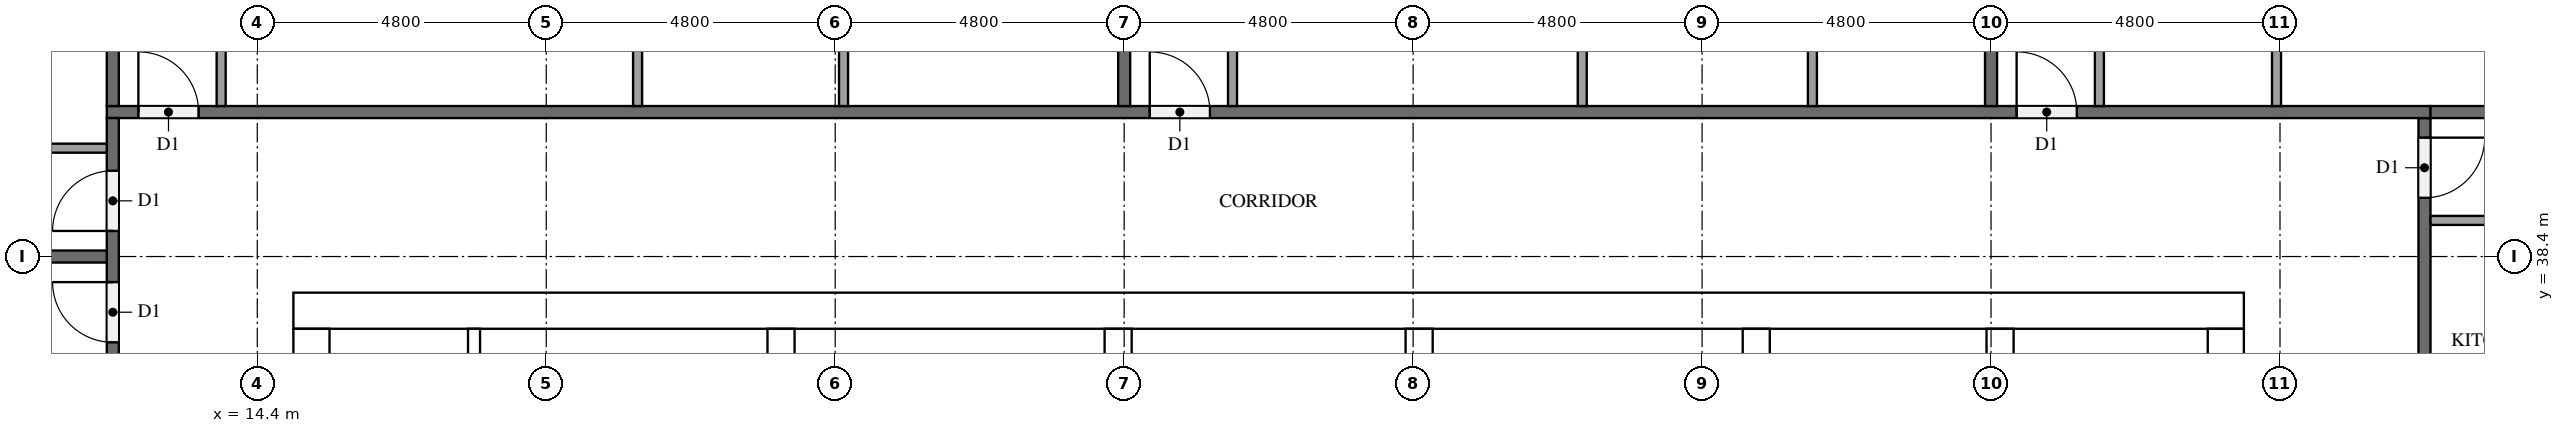
"""IFC4 building model, lengths in metres.
Left out: names, types, materials, properties, quantities, classifications, styles, units other than length and angle.
Written with IfcOpenShell. Run it as: python <this file> out.ifc"""

import sys

from ifc_helpers import new_model, si_unit, direction, frame, frame_2d, origin, place, context, subcontext, project, spatial, rectangle, extrude, element, fill, save


model = new_model("IFC4")
c1 = context("Model", 3, precision=1e-05, world=origin(), true_north=direction((0.0, 1.0)))
c2 = subcontext(c1, "Body", "Model", "MODEL_VIEW")
j1 = project(units=[si_unit("LENGTHUNIT", "METRE"), si_unit("PLANEANGLEUNIT", "RADIAN")], contexts=[c1])
p1 = place(None, origin())
s1 = spatial("IfcSite", under=j1, at=p1, CompositionType="ELEMENT")
p2 = place(p1, origin())
s2 = spatial("IfcBuilding", under=s1, at=p2, CompositionType="ELEMENT")
p3 = place(p2, frame((0.0, 0.0, 252.7)))
s3 = spatial("IfcBuildingStorey", under=s2, at=p3, CompositionType="ELEMENT", Elevation=252.7)
p4 = place(p3, frame((15.0, 37.5, 0.0), z_axis=(0.0, 0.0, 1.0), x_axis=(1.0, 0.0, 0.0)))
e1 = element("IfcWall", 1, at=p4, inside=s3, PredefinedType="SHEAR", context=c2, shape_type="SweptSolid", body=[
    extrude(rectangle(XDim=32.4, YDim=0.6, at=frame_2d((16.2, 0.0))), origin(), (0.0, 0.0, 1.0), 3.2),
])
p5 = place(p4, frame((15.3, 0.0, 0.0)))
e2 = element("IfcOpeningElement", 2, at=p5, cuts=e1, PredefinedType="OPENING", context=c2, shape_type="SweptSolid", body=[
    extrude(rectangle(XDim=1.8, YDim=2.1, at=frame_2d((0.9, 1.05))), frame((0.0, 0.31, 0.0), z_axis=(0.0, -1.0, 0.0), x_axis=(1.0, 0.0, 0.0)), (0.0, 0.0, 1.0), 0.62),
])
p6 = place(p4, frame((1.25, 0.0, 0.0)))
e3 = element("IfcOpeningElement", 3, at=p6, cuts=e1, PredefinedType="OPENING", context=c2, shape_type="SweptSolid", body=[
    extrude(rectangle(XDim=1.0, YDim=2.1, at=frame_2d((0.5, 1.05))), frame((0.0, 0.31, 0.0), z_axis=(0.0, -1.0, 0.0), x_axis=(1.0, 0.0, 0.0)), (0.0, 0.0, 1.0), 0.62),
])
p7 = place(p4, frame((4.988, 0.0, 0.0)))
e4 = element("IfcOpeningElement", 4, at=p7, cuts=e1, PredefinedType="OPENING", context=c2, shape_type="SweptSolid", body=[
    extrude(rectangle(XDim=1.0, YDim=2.1, at=frame_2d((0.5, 1.05))), frame((0.0, 0.31, 0.0), z_axis=(0.0, -1.0, 0.0), x_axis=(1.0, 0.0, 0.0)), (0.0, 0.0, 1.0), 0.62),
])
p8 = place(p3, frame((15.3, 15.6, 0.0), z_axis=(0.0, 0.0, 1.0), x_axis=(0.0, 1.0, 0.0)))
e5 = element("IfcWall", 5, at=p8, inside=s3, PredefinedType="SHEAR", context=c2, shape_type="SweptSolid", body=[
    extrude(rectangle(XDim=21.6, YDim=0.6, at=frame_2d((10.8, 0.0))), origin(), (0.0, 0.0, 1.0), 3.2),
])
p9 = place(p8, frame((5.16, 0.0, 0.0)))
e6 = element("IfcOpeningElement", 6, at=p9, cuts=e5, PredefinedType="OPENING", context=c2, shape_type="SweptSolid", body=[
    extrude(rectangle(XDim=1.2, YDim=2.1, at=frame_2d((0.6, 1.05))), frame((0.0, 0.31, 0.0), z_axis=(0.0, -1.0, 0.0), x_axis=(1.0, 0.0, 0.0)), (0.0, 0.0, 1.0), 0.62),
])
p10 = place(p3, frame((47.1, 15.6, 0.0), z_axis=(0.0, 0.0, 1.0), x_axis=(0.0, 1.0, 0.0)))
e7 = element("IfcWall", 7, at=p10, inside=s3, PredefinedType="SHEAR", context=c2, shape_type="SweptSolid", body=[
    extrude(rectangle(XDim=21.6, YDim=0.6, at=frame_2d((10.8, 0.0))), origin(), (0.0, 0.0, 1.0), 3.2),
])
p11 = place(p10, frame((10.5, 0.0, 0.0)))
e8 = element("IfcOpeningElement", 8, at=p11, cuts=e7, PredefinedType="OPENING", context=c2, shape_type="SweptSolid", body=[
    extrude(rectangle(XDim=1.2, YDim=2.1, at=frame_2d((0.6, 1.05))), frame((0.0, 0.31, 0.0), z_axis=(0.0, -1.0, 0.0), x_axis=(1.0, 0.0, 0.0)), (0.0, 0.0, 1.0), 0.62),
])
p12 = place(p3, frame((23.1, 15.6, 0.0), z_axis=(0.0, 0.0, 1.0), x_axis=(0.0, 1.0, 0.0)))
e9 = element("IfcWall", 9, at=p12, inside=s3, PredefinedType="SHEAR", context=c2, shape_type="SweptSolid", body=[
    extrude(rectangle(XDim=21.6, YDim=0.45, at=frame_2d((10.8, 0.0))), origin(), (0.0, 0.0, 1.0), 3.2),
])
p13 = place(p3, frame((39.3, 27.75, 0.0), z_axis=(0.0, 0.0, 1.0), x_axis=(0.0, 1.0, 0.0)))
e10 = element("IfcWall", 10, at=p13, inside=s3, PredefinedType="SHEAR", context=c2, shape_type="SweptSolid", body=[
    extrude(rectangle(XDim=9.45, YDim=0.45, at=frame_2d((4.725, 0.0))), origin(), (0.0, 0.0, 1.0), 3.2),
])
p14 = place(p3, frame((43.35, 27.75, 0.0), z_axis=(0.0, 0.0, 1.0), x_axis=(0.0, 1.0, 0.0)))
e11 = element("IfcWall", 11, at=p14, inside=s3, PredefinedType="SHEAR", context=c2, shape_type="SweptSolid", body=[
    extrude(rectangle(XDim=9.45, YDim=0.45, at=frame_2d((4.725, 0.0))), origin(), (0.0, 0.0, 1.0), 3.2),
])
p15 = place(p14, frame((7.65, 0.0, 0.0)))
e12 = element("IfcOpeningElement", 12, at=p15, cuts=e11, PredefinedType="OPENING", context=c2, shape_type="SweptSolid", body=[
    extrude(rectangle(XDim=1.2, YDim=2.1, at=frame_2d((0.6, 1.05))), frame((0.0, 0.235, 0.0), z_axis=(0.0, -1.0, 0.0), x_axis=(1.0, 0.0, 0.0)), (0.0, 0.0, 1.0), 0.47),
])
for number, where, z_axis, x_axis in (
    (13, (28.7, 33.775, 0.0), (0.0, 0.0, 1.0), (0.0, 1.0, 0.0)),
    (14, (33.7, 33.775, 0.0), (0.0, 0.0, 1.0), (0.0, 1.0, 0.0)),
):
    element("IfcWall", number, at=place(p3, frame(where, z_axis=z_axis, x_axis=x_axis)), inside=s3, PredefinedType="SHEAR", context=c2, shape_type="SweptSolid", body=[
        extrude(rectangle(XDim=3.425, YDim=0.45, at=frame_2d((1.712, 0.0))), origin(), (0.0, 0.0, 1.0), 3.2),
    ])
p16 = place(p3, frame((18.001, 31.475, 0.0), z_axis=(0.0, 0.0, 1.0), x_axis=(0.0, 1.0, 0.0)))
e15 = element("IfcWall", 15, at=p16, inside=s3, PredefinedType="PARTITIONING", context=c2, shape_type="SweptSolid", body=[
    extrude(rectangle(XDim=5.725, YDim=0.2, at=frame_2d((2.862, 0.0))), origin(), (0.0, 0.0, 1.0), 3.2),
])
p17 = place(p3, frame((50.4, 40.7, 0.0), z_axis=(0.0, 0.0, 1.0), x_axis=(0.0, -1.0, 0.0)))
e16 = element("IfcWall", 16, at=p17, inside=s3, PredefinedType="PARTITIONING", context=c2, shape_type="SweptSolid", body=[
    extrude(rectangle(XDim=28.6, YDim=0.2, at=frame_2d((14.3, 0.0))), origin(), (0.0, 0.0, 1.0), 3.2),
])
p18 = place(p17, frame((19.525, 0.0, 0.0)))
e17 = element("IfcOpeningElement", 17, at=p18, cuts=e16, PredefinedType="OPENING", context=c2, shape_type="SweptSolid", body=[
    extrude(rectangle(XDim=1.0, YDim=2.1, at=frame_2d((0.5, 1.05))), frame((0.0, 0.11, 0.0), z_axis=(0.0, -1.0, 0.0), x_axis=(1.0, 0.0, 0.0)), (0.0, 0.0, 1.0), 0.22),
])
p19 = place(p17, frame((17.675, 0.0, 0.0)))
e18 = element("IfcOpeningElement", 18, at=p19, cuts=e16, PredefinedType="OPENING", context=c2, shape_type="SweptSolid", body=[
    extrude(rectangle(XDim=1.0, YDim=2.1, at=frame_2d((0.5, 1.05))), frame((0.0, 0.11, 0.0), z_axis=(0.0, -1.0, 0.0), x_axis=(1.0, 0.0, 0.0)), (0.0, 0.0, 1.0), 0.22),
])
p20 = place(p17, frame((0.325, 0.0, 0.0)))
e19 = element("IfcOpeningElement", 19, at=p20, cuts=e16, PredefinedType="OPENING", context=c2, shape_type="SweptSolid", body=[
    extrude(rectangle(XDim=1.0, YDim=2.1, at=frame_2d((0.5, 1.05))), frame((0.0, 0.11, 0.0), z_axis=(0.0, -1.0, 0.0), x_axis=(1.0, 0.0, 0.0)), (0.0, 0.0, 1.0), 0.22),
])
p21 = place(p3, frame((11.9, 40.8, 0.0), z_axis=(0.0, 0.0, 1.0), x_axis=(1.0, 0.0, 0.0)))
e20 = element("IfcWall", 20, at=p21, inside=s3, PredefinedType="PARTITIONING", context=c2, shape_type="SweptSolid", body=[
    extrude(rectangle(XDim=38.6, YDim=0.2, at=frame_2d((19.3, 0.0))), origin(), (0.0, 0.0, 1.0), 3.2),
])
p22 = place(p21, frame((31.725, 0.0, 0.0)))
e21 = element("IfcOpeningElement", 21, at=p22, cuts=e20, PredefinedType="OPENING", context=c2, shape_type="SweptSolid", body=[
    extrude(rectangle(XDim=1.0, YDim=2.1, at=frame_2d((0.5, 1.05))), frame((0.0, 0.11, 0.0), z_axis=(0.0, -1.0, 0.0), x_axis=(1.0, 0.0, 0.0)), (0.0, 0.0, 1.0), 0.22),
])
p23 = place(p21, frame((17.325, 0.0, 0.0)))
e22 = element("IfcOpeningElement", 22, at=p23, cuts=e20, PredefinedType="OPENING", context=c2, shape_type="SweptSolid", body=[
    extrude(rectangle(XDim=1.0, YDim=2.1, at=frame_2d((0.5, 1.05))), frame((0.0, 0.11, 0.0), z_axis=(0.0, -1.0, 0.0), x_axis=(1.0, 0.0, 0.0)), (0.0, 0.0, 1.0), 0.22),
])
p24 = place(p21, frame((0.525, 0.0, 0.0)))
e23 = element("IfcOpeningElement", 23, at=p24, cuts=e20, PredefinedType="OPENING", context=c2, shape_type="SweptSolid", body=[
    extrude(rectangle(XDim=1.0, YDim=2.1, at=frame_2d((0.5, 1.05))), frame((0.0, 0.11, 0.0), z_axis=(0.0, -1.0, 0.0), x_axis=(1.0, 0.0, 0.0)), (0.0, 0.0, 1.0), 0.22),
])
p25 = place(p3, frame((12.0, 12.1, 0.0), z_axis=(0.0, 0.0, 1.0), x_axis=(0.0, 1.0, 0.0)))
e24 = element("IfcWall", 24, at=p25, inside=s3, PredefinedType="PARTITIONING", context=c2, shape_type="SweptSolid", body=[
    extrude(rectangle(XDim=28.6, YDim=0.2, at=frame_2d((14.3, 0.0))), origin(), (0.0, 0.0, 1.0), 3.2),
])
p26 = place(p25, frame((26.725, 0.0, 0.0)))
e25 = element("IfcOpeningElement", 25, at=p26, cuts=e24, PredefinedType="OPENING", context=c2, shape_type="SweptSolid", body=[
    extrude(rectangle(XDim=1.0, YDim=2.1, at=frame_2d((0.5, 1.05))), frame((0.0, 0.11, 0.0), z_axis=(0.0, -1.0, 0.0), x_axis=(1.0, 0.0, 0.0)), (0.0, 0.0, 1.0), 0.22),
])
p27 = place(p25, frame((24.875, 0.0, 0.0)))
e26 = element("IfcOpeningElement", 26, at=p27, cuts=e24, PredefinedType="OPENING", context=c2, shape_type="SweptSolid", body=[
    extrude(rectangle(XDim=1.0, YDim=2.1, at=frame_2d((0.5, 1.05))), frame((0.0, 0.11, 0.0), z_axis=(0.0, -1.0, 0.0), x_axis=(1.0, 0.0, 0.0)), (0.0, 0.0, 1.0), 0.22),
])
p28 = place(p25, frame((17.675, 0.0, 0.0)))
e27 = element("IfcOpeningElement", 27, at=p28, cuts=e24, PredefinedType="OPENING", context=c2, shape_type="SweptSolid", body=[
    extrude(rectangle(XDim=1.0, YDim=2.1, at=frame_2d((0.5, 1.05))), frame((0.0, 0.11, 0.0), z_axis=(0.0, -1.0, 0.0), x_axis=(1.0, 0.0, 0.0)), (0.0, 0.0, 1.0), 0.22),
])
p29 = place(p25, frame((2.725, 0.0, 0.0)))
e28 = element("IfcOpeningElement", 28, at=p29, cuts=e24, PredefinedType="OPENING", context=c2, shape_type="SweptSolid", body=[
    extrude(rectangle(XDim=1.0, YDim=2.1, at=frame_2d((0.5, 1.05))), frame((0.0, 0.11, 0.0), z_axis=(0.0, -1.0, 0.0), x_axis=(1.0, 0.0, 0.0)), (0.0, 0.0, 1.0), 0.22),
])
p30 = place(p25, frame((0.875, 0.0, 0.0)))
e29 = element("IfcOpeningElement", 29, at=p30, cuts=e24, PredefinedType="OPENING", context=c2, shape_type="SweptSolid", body=[
    extrude(rectangle(XDim=1.0, YDim=2.1, at=frame_2d((0.5, 1.05))), frame((0.0, 0.11, 0.0), z_axis=(0.0, -1.0, 0.0), x_axis=(1.0, 0.0, 0.0)), (0.0, 0.0, 1.0), 0.22),
])
p31 = place(p3, frame((50.5, 40.8, 0.0), z_axis=(0.0, 0.0, 1.0), x_axis=(1.0, 0.0, 0.0)))
e30 = element("IfcWall", 30, at=p31, inside=s3, PredefinedType="PARTITIONING", context=c2, shape_type="SweptSolid", body=[
    extrude(rectangle(XDim=7.0, YDim=0.2, at=frame_2d((3.5, 0.0))), origin(), (0.0, 0.0, 1.0), 3.2),
])
p32 = place(p3, frame((43.2, 52.525, 0.0), z_axis=(0.0, 0.0, 1.0), x_axis=(0.0, -1.0, 0.0)))
e31 = element("IfcWall", 31, at=p32, inside=s3, PredefinedType="PARTITIONING", context=c2, shape_type="SweptSolid", body=[
    extrude(rectangle(XDim=11.625, YDim=0.2, at=frame_2d((5.812, 0.0))), origin(), (0.0, 0.0, 1.0), 3.2),
])
for number, where, z_axis, x_axis in (
    (32, (28.8, 52.7, 0.0), (0.0, 0.0, 1.0), (0.0, -1.0, 0.0)),
    (33, (12.0, 52.7, 0.0), (0.0, 0.0, 1.0), (0.0, -1.0, 0.0)),
):
    element("IfcWall", number, at=place(p3, frame(where, z_axis=z_axis, x_axis=x_axis)), inside=s3, PredefinedType="PARTITIONING", context=c2, shape_type="SweptSolid", body=[
        extrude(rectangle(XDim=11.8, YDim=0.2, at=frame_2d((5.9, 0.0))), origin(), (0.0, 0.0, 1.0), 3.2),
    ])
p33 = place(p3, frame((0.275, 38.4, 0.0), z_axis=(0.0, 0.0, 1.0), x_axis=(1.0, 0.0, 0.0)))
e34 = element("IfcWall", 34, at=p33, inside=s3, PredefinedType="PARTITIONING", context=c2, shape_type="SweptSolid", body=[
    extrude(rectangle(XDim=11.625, YDim=0.2, at=frame_2d((5.812, 0.0))), origin(), (0.0, 0.0, 1.0), 3.2),
])
p34 = place(p3, frame((50.5, 39.0, 0.0), z_axis=(0.0, 0.0, 1.0), x_axis=(1.0, 0.0, 0.0)))
e35 = element("IfcWall", 35, at=p34, inside=s3, PredefinedType="PARTITIONING", context=c2, shape_type="SweptSolid", body=[
    extrude(rectangle(XDim=2.225, YDim=0.15, at=frame_2d((1.113, 0.0))), origin(), (0.0, 0.0, 1.0), 3.2),
])
p35 = place(p3, frame((47.942, 40.9, 0.0), z_axis=(0.0, 0.0, 1.0), x_axis=(0.0, 1.0, 0.0)))
e36 = element("IfcWall", 36, at=p35, inside=s3, PredefinedType="PARTITIONING", context=c2, shape_type="SweptSolid", body=[
    extrude(rectangle(XDim=2.975, YDim=0.15, at=frame_2d((1.488, 0.0))), origin(), (0.0, 0.0, 1.0), 3.2),
])
p36 = place(p3, frame((45.0, 40.9, 0.0), z_axis=(0.0, 0.0, 1.0), x_axis=(0.0, 1.0, 0.0)))
e37 = element("IfcWall", 37, at=p36, inside=s3, PredefinedType="PARTITIONING", context=c2, shape_type="SweptSolid", body=[
    extrude(rectangle(XDim=3.125, YDim=0.15, at=frame_2d((1.562, 0.0))), origin(), (0.0, 0.0, 1.0), 3.2),
])
for number, where, z_axis, x_axis in (
    (38, (36.41, 40.9, 0.0), (0.0, 0.0, 1.0), (0.0, 1.0, 0.0)),
    (39, (40.233, 40.9, 0.0), (0.0, 0.0, 1.0), (0.0, 1.0, 0.0)),
):
    element("IfcWall", number, at=place(p3, frame(where, z_axis=z_axis, x_axis=x_axis)), inside=s3, PredefinedType="PARTITIONING", context=c2, shape_type="SweptSolid", body=[
        extrude(rectangle(XDim=2.975, YDim=0.15, at=frame_2d((1.488, 0.0))), origin(), (0.0, 0.0, 1.0), 3.2),
    ])
p37 = place(p3, frame((30.6, 40.9, 0.0), z_axis=(0.0, 0.0, 1.0), x_axis=(0.0, 1.0, 0.0)))
e40 = element("IfcWall", 40, at=p37, inside=s3, PredefinedType="PARTITIONING", context=c2, shape_type="SweptSolid", body=[
    extrude(rectangle(XDim=3.125, YDim=0.15, at=frame_2d((1.562, 0.0))), origin(), (0.0, 0.0, 1.0), 3.2),
])
for number, where, z_axis, x_axis in (
    (41, (20.717, 40.9, 0.0), (0.0, 0.0, 1.0), (0.0, 1.0, 0.0)),
    (42, (24.138, 40.9, 0.0), (0.0, 0.0, 1.0), (0.0, 1.0, 0.0)),
):
    element("IfcWall", number, at=place(p3, frame(where, z_axis=z_axis, x_axis=x_axis)), inside=s3, PredefinedType="PARTITIONING", context=c2, shape_type="SweptSolid", body=[
        extrude(rectangle(XDim=4.325, YDim=0.15, at=frame_2d((2.163, 0.0))), origin(), (0.0, 0.0, 1.0), 3.2),
    ])
p38 = place(p3, frame((13.8, 40.9, 0.0), z_axis=(0.0, 0.0, 1.0), x_axis=(0.0, 1.0, 0.0)))
e43 = element("IfcWall", 43, at=p38, inside=s3, PredefinedType="PARTITIONING", context=c2, shape_type="SweptSolid", body=[
    extrude(rectangle(XDim=4.475, YDim=0.15, at=frame_2d((2.238, 0.0))), origin(), (0.0, 0.0, 1.0), 3.2),
])
p39 = place(p3, frame((11.9, 40.2, 0.0), z_axis=(0.0, 0.0, 1.0), x_axis=(-1.0, 0.0, 0.0)))
e44 = element("IfcWall", 44, at=p39, inside=s3, PredefinedType="PARTITIONING", context=c2, shape_type="SweptSolid", body=[
    extrude(rectangle(XDim=3.425, YDim=0.15, at=frame_2d((1.712, 0.0))), origin(), (0.0, 0.0, 1.0), 3.2),
])
p40 = place(p5, origin())
e45 = element("IfcDoor", 45, at=p40, inside=s3, OperationType="DOUBLE_DOOR_SINGLE_SWING", PredefinedType="DOOR", context=c2, shape_type="SweptSolid", body=[
    extrude(rectangle(XDim=1.8, YDim=2.1, at=frame_2d((0.9, 1.05))), frame((0.0, 0.025, 0.0), z_axis=(0.0, -1.0, 0.0), x_axis=(1.0, 0.0, 0.0)), (0.0, 0.0, 1.0), 0.05),
])
fill(e2, e45)
p41 = place(p6, origin())
e46 = element("IfcDoor", 46, at=p41, inside=s3, OperationType="SINGLE_SWING_LEFT", PredefinedType="DOOR", context=c2, shape_type="SweptSolid", body=[
    extrude(rectangle(XDim=1.0, YDim=2.1, at=frame_2d((0.5, 1.05))), frame((0.0, 0.025, 0.0), z_axis=(0.0, -1.0, 0.0), x_axis=(1.0, 0.0, 0.0)), (0.0, 0.0, 1.0), 0.05),
])
fill(e3, e46)
p42 = place(p7, origin())
e47 = element("IfcDoor", 47, at=p42, inside=s3, OperationType="SINGLE_SWING_RIGHT", PredefinedType="DOOR", context=c2, shape_type="SweptSolid", body=[
    extrude(rectangle(XDim=1.0, YDim=2.1, at=frame_2d((0.5, 1.05))), frame((0.0, 0.025, 0.0), z_axis=(0.0, -1.0, 0.0), x_axis=(1.0, 0.0, 0.0)), (0.0, 0.0, 1.0), 0.05),
])
fill(e4, e47)
p43 = place(p20, origin())
e48 = element("IfcDoor", 48, at=p43, inside=s3, OperationType="SINGLE_SWING_LEFT", PredefinedType="DOOR", context=c2, shape_type="SweptSolid", body=[
    extrude(rectangle(XDim=1.0, YDim=2.1, at=frame_2d((0.5, 1.05))), frame((0.0, 0.025, 0.0), z_axis=(0.0, -1.0, 0.0), x_axis=(1.0, 0.0, 0.0)), (0.0, 0.0, 1.0), 0.05),
])
fill(e19, e48)
p44 = place(p22, origin())
e49 = element("IfcDoor", 49, at=p44, inside=s3, OperationType="SINGLE_SWING_LEFT", PredefinedType="DOOR", context=c2, shape_type="SweptSolid", body=[
    extrude(rectangle(XDim=1.0, YDim=2.1, at=frame_2d((0.5, 1.05))), frame((0.0, 0.025, 0.0), z_axis=(0.0, -1.0, 0.0), x_axis=(1.0, 0.0, 0.0)), (0.0, 0.0, 1.0), 0.05),
])
fill(e21, e49)
p45 = place(p23, origin())
e50 = element("IfcDoor", 50, at=p45, inside=s3, OperationType="SINGLE_SWING_LEFT", PredefinedType="DOOR", context=c2, shape_type="SweptSolid", body=[
    extrude(rectangle(XDim=1.0, YDim=2.1, at=frame_2d((0.5, 1.05))), frame((0.0, 0.025, 0.0), z_axis=(0.0, -1.0, 0.0), x_axis=(1.0, 0.0, 0.0)), (0.0, 0.0, 1.0), 0.05),
])
fill(e22, e50)
p46 = place(p24, origin())
e51 = element("IfcDoor", 51, at=p46, inside=s3, OperationType="SINGLE_SWING_LEFT", PredefinedType="DOOR", context=c2, shape_type="SweptSolid", body=[
    extrude(rectangle(XDim=1.0, YDim=2.1, at=frame_2d((0.5, 1.05))), frame((0.0, 0.025, 0.0), z_axis=(0.0, -1.0, 0.0), x_axis=(1.0, 0.0, 0.0)), (0.0, 0.0, 1.0), 0.05),
])
fill(e23, e51)
p47 = place(p26, origin())
e52 = element("IfcDoor", 52, at=p47, inside=s3, OperationType="SINGLE_SWING_LEFT", PredefinedType="DOOR", context=c2, shape_type="SweptSolid", body=[
    extrude(rectangle(XDim=1.0, YDim=2.1, at=frame_2d((0.5, 1.05))), frame((0.0, 0.025, 0.0), z_axis=(0.0, -1.0, 0.0), x_axis=(1.0, 0.0, 0.0)), (0.0, 0.0, 1.0), 0.05),
])
fill(e25, e52)
p48 = place(p27, origin())
e53 = element("IfcDoor", 53, at=p48, inside=s3, OperationType="SINGLE_SWING_RIGHT", PredefinedType="DOOR", context=c2, shape_type="SweptSolid", body=[
    extrude(rectangle(XDim=1.0, YDim=2.1, at=frame_2d((0.5, 1.05))), frame((0.0, 0.025, 0.0), z_axis=(0.0, -1.0, 0.0), x_axis=(1.0, 0.0, 0.0)), (0.0, 0.0, 1.0), 0.05),
])
fill(e26, e53)
save(model, sys.argv[1])
